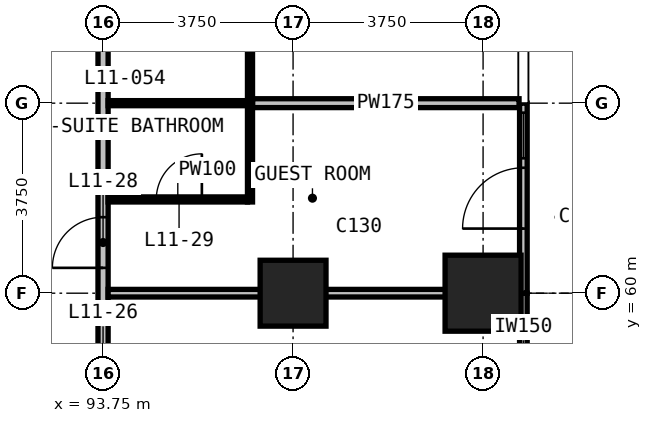
"""IFC4 building model, lengths in metres.
Left out: names, types, materials, properties, quantities, classifications, styles, units other than length and angle.
Written with IfcOpenShell. Run it as: python <this file> out.ifc"""

import sys

from ifc_helpers import new_model, si_unit, direction, frame, frame_2d, origin, origin_2d, place, context, subcontext, project, spatial, rectangle, extrude, element, fill, save


model = new_model("IFC4")
c1 = context("Model", 3, precision=1e-05, world=origin(), true_north=direction((0.0, 1.0)))
c2 = subcontext(c1, "Body", "Model", "MODEL_VIEW")
j1 = project(units=[si_unit("LENGTHUNIT", "METRE"), si_unit("PLANEANGLEUNIT", "RADIAN")], contexts=[c1])
p1 = place(None, origin())
s1 = spatial("IfcSite", under=j1, at=p1, CompositionType="ELEMENT")
p2 = place(p1, origin())
s2 = spatial("IfcBuilding", under=s1, at=p2, CompositionType="ELEMENT")
p3 = place(p2, frame((0.0, 0.0, 56.0)))
s3 = spatial("IfcBuildingStorey", under=s2, at=p3, CompositionType="ELEMENT", Elevation=56.0)
p4 = place(p3, frame((97.5, 60.0, 0.0), z_axis=(0.0, 0.0, 1.0), x_axis=(1.0, 0.0, 0.0)))
e1 = element("IfcColumn", 1, at=p4, inside=s3, PredefinedType="COLUMN", context=c2, shape_type="SweptSolid", body=[
    extrude(rectangle(XDim=1.3, YDim=1.3, at=origin_2d()), origin(), (0.0, 0.0, 1.0), 3.3),
])
p5 = place(p3, frame((101.25, 60.0, 0.0), z_axis=(0.0, 0.0, 1.0), x_axis=(1.0, 0.0, 0.0)))
e2 = element("IfcColumn", 2, at=p5, inside=s3, PredefinedType="COLUMN", context=c2, shape_type="SweptSolid", body=[
    extrude(rectangle(XDim=1.5, YDim=1.5, at=origin_2d()), origin(), (0.0, 0.0, 1.0), 3.3),
])
p6 = place(p3, frame((102.045, 56.25, 0.0), z_axis=(0.0, 0.0, 1.0), x_axis=(0.0, 1.0, 0.0)))
e3 = element("IfcWall", 3, at=p6, inside=s3, PredefinedType="SOLIDWALL", context=c2, shape_type="SweptSolid", body=[
    extrude(rectangle(XDim=3.75, YDim=0.15, at=frame_2d((1.875, 0.0))), origin(), (0.0, 0.0, 1.0), 3.0),
])
p7 = place(p6, frame((0.188, 0.0, 0.1)))
e4 = element("IfcOpeningElement", 4, at=p7, cuts=e3, PredefinedType="OPENING", context=c2, shape_type="SweptSolid", body=[
    extrude(rectangle(XDim=0.9, YDim=2.4, at=frame_2d((0.45, 1.2))), frame((0.0, 0.085, 0.0), z_axis=(0.0, -1.0, 0.0), x_axis=(1.0, 0.0, 0.0)), (0.0, 0.0, 1.0), 0.17),
])
p8 = place(p6, frame((1.275, 0.0, 0.0)))
e5 = element("IfcOpeningElement", 5, at=p8, cuts=e3, PredefinedType="OPENING", context=c2, shape_type="SweptSolid", body=[
    extrude(rectangle(XDim=1.2, YDim=2.4, at=frame_2d((0.6, 1.2))), frame((0.0, 0.085, 0.0), z_axis=(0.0, -1.0, 0.0), x_axis=(1.0, 0.0, 0.0)), (0.0, 0.0, 1.0), 0.17),
])
p9 = place(p3, frame((102.045, 60.0, 0.0), z_axis=(0.0, 0.0, 1.0), x_axis=(0.0, 1.0, 0.0)))
e6 = element("IfcWall", 6, at=p9, inside=s3, PredefinedType="SOLIDWALL", context=c2, shape_type="SweptSolid", body=[
    extrude(rectangle(XDim=3.75, YDim=0.15, at=frame_2d((1.875, 0.0))), origin(), (0.0, 0.0, 1.0), 3.0),
])
p10 = place(p9, frame((1.275, 0.0, 0.0)))
e7 = element("IfcOpeningElement", 7, at=p10, cuts=e6, PredefinedType="OPENING", context=c2, shape_type="SweptSolid", body=[
    extrude(rectangle(XDim=1.2, YDim=2.4, at=frame_2d((0.6, 1.2))), frame((0.0, 0.085, 0.0), z_axis=(0.0, -1.0, 0.0), x_axis=(1.0, 0.0, 0.0)), (0.0, 0.0, 1.0), 0.17),
])
p11 = place(p9, frame((2.663, 0.0, 0.1)))
e8 = element("IfcOpeningElement", 8, at=p11, cuts=e6, PredefinedType="OPENING", context=c2, shape_type="SweptSolid", body=[
    extrude(rectangle(XDim=0.9, YDim=2.4, at=frame_2d((0.45, 1.2))), frame((0.0, 0.085, 0.0), z_axis=(0.0, -1.0, 0.0), x_axis=(1.0, 0.0, 0.0)), (0.0, 0.0, 1.0), 0.17),
])
p12 = place(p3, frame((93.75, 52.4, 0.0), z_axis=(0.0, 0.0, 1.0), x_axis=(0.0, 1.0, 0.0)))
e9 = element("IfcWall", 9, at=p12, inside=s3, PredefinedType="PARTITIONING", context=c2, shape_type="SweptSolid", body=[
    extrude(rectangle(XDim=38.31, YDim=0.2, at=frame_2d((19.155, 0.0))), origin(), (0.0, 0.0, 1.0), 3.0),
])
p13 = place(p12, frame((5.5, 0.0, 0.0)))
e10 = element("IfcOpeningElement", 10, at=p13, cuts=e9, PredefinedType="OPENING", context=c2, shape_type="SweptSolid", body=[
    extrude(rectangle(XDim=1.0, YDim=2.2, at=frame_2d((0.5, 1.1))), frame((0.0, 0.11, 0.0), z_axis=(0.0, -1.0, 0.0), x_axis=(1.0, 0.0, 0.0)), (0.0, 0.0, 1.0), 0.22),
])
p14 = place(p12, frame((8.1, 0.0, 0.0)))
e11 = element("IfcOpeningElement", 11, at=p14, cuts=e9, PredefinedType="OPENING", context=c2, shape_type="SweptSolid", body=[
    extrude(rectangle(XDim=1.0, YDim=2.2, at=frame_2d((0.5, 1.1))), frame((0.0, 0.11, 0.0), z_axis=(0.0, -1.0, 0.0), x_axis=(1.0, 0.0, 0.0)), (0.0, 0.0, 1.0), 0.22),
])
p15 = place(p12, frame((13.6, 0.0, 0.0)))
e12 = element("IfcOpeningElement", 12, at=p15, cuts=e9, PredefinedType="OPENING", context=c2, shape_type="SweptSolid", body=[
    extrude(rectangle(XDim=1.0, YDim=2.2, at=frame_2d((0.5, 1.1))), frame((0.0, 0.11, 0.0), z_axis=(0.0, -1.0, 0.0), x_axis=(1.0, 0.0, 0.0)), (0.0, 0.0, 1.0), 0.22),
])
p16 = place(p12, frame((16.2, 0.0, 0.0)))
e13 = element("IfcOpeningElement", 13, at=p16, cuts=e9, PredefinedType="OPENING", context=c2, shape_type="SweptSolid", body=[
    extrude(rectangle(XDim=1.0, YDim=2.2, at=frame_2d((0.5, 1.1))), frame((0.0, 0.11, 0.0), z_axis=(0.0, -1.0, 0.0), x_axis=(1.0, 0.0, 0.0)), (0.0, 0.0, 1.0), 0.22),
])
p17 = place(p12, frame((24.85, 0.0, 0.0)))
e14 = element("IfcOpeningElement", 14, at=p17, cuts=e9, PredefinedType="OPENING", context=c2, shape_type="SweptSolid", body=[
    extrude(rectangle(XDim=1.0, YDim=2.2, at=frame_2d((0.5, 1.1))), frame((0.0, 0.11, 0.0), z_axis=(0.0, -1.0, 0.0), x_axis=(1.0, 0.0, 0.0)), (0.0, 0.0, 1.0), 0.22),
])
p18 = place(p12, frame((26.85, 0.0, 0.0)))
e15 = element("IfcOpeningElement", 15, at=p18, cuts=e9, PredefinedType="OPENING", context=c2, shape_type="SweptSolid", body=[
    extrude(rectangle(XDim=1.0, YDim=2.2, at=frame_2d((0.5, 1.1))), frame((0.0, 0.11, 0.0), z_axis=(0.0, -1.0, 0.0), x_axis=(1.0, 0.0, 0.0)), (0.0, 0.0, 1.0), 0.22),
])
p19 = place(p12, frame((31.55, 0.0, 0.0)))
e16 = element("IfcOpeningElement", 16, at=p19, cuts=e9, PredefinedType="OPENING", context=c2, shape_type="SweptSolid", body=[
    extrude(rectangle(XDim=0.9, YDim=2.2, at=frame_2d((0.45, 1.1))), frame((0.0, 0.11, 0.0), z_axis=(0.0, -1.0, 0.0), x_axis=(1.0, 0.0, 0.0)), (0.0, 0.0, 1.0), 0.22),
])
p20 = place(p12, frame((35.65, 0.0, 0.0)))
e17 = element("IfcOpeningElement", 17, at=p20, cuts=e9, PredefinedType="OPENING", context=c2, shape_type="SweptSolid", body=[
    extrude(rectangle(XDim=0.9, YDim=2.2, at=frame_2d((0.45, 1.1))), frame((0.0, 0.11, 0.0), z_axis=(0.0, -1.0, 0.0), x_axis=(1.0, 0.0, 0.0)), (0.0, 0.0, 1.0), 0.22),
])
p21 = place(p3, frame((96.7, 63.75, 0.0), z_axis=(0.0, 0.0, 1.0), x_axis=(1.0, 0.0, 0.0)))
e18 = element("IfcWall", 18, at=p21, inside=s3, PredefinedType="PARTITIONING", context=c2, shape_type="SweptSolid", body=[
    extrude(rectangle(XDim=5.26, YDim=0.175, at=frame_2d((2.63, 0.0))), origin(), (0.0, 0.0, 1.0), 3.0),
])
p22 = place(p3, frame((93.85, 60.0, 0.0), z_axis=(0.0, 0.0, 1.0), x_axis=(1.0, 0.0, 0.0)))
e19 = element("IfcWall", 19, at=p22, inside=s3, PredefinedType="PARTITIONING", context=c2, shape_type="SweptSolid", body=[
    extrude(rectangle(XDim=8.11, YDim=0.15, at=frame_2d((4.055, 0.0))), origin(), (0.0, 0.0, 1.0), 3.0),
])
p23 = place(p3, frame((93.85, 61.85, 0.0), z_axis=(0.0, 0.0, 1.0), x_axis=(1.0, 0.0, 0.0)))
e20 = element("IfcWall", 20, at=p23, inside=s3, PredefinedType="PARTITIONING", context=c2, shape_type="SweptSolid", body=[
    extrude(rectangle(XDim=2.75, YDim=0.1, at=frame_2d((1.375, 0.0))), origin(), (0.0, 0.0, 1.0), 3.0),
])
p24 = place(p23, frame((0.95, 0.0, 0.0)))
e21 = element("IfcOpeningElement", 21, at=p24, cuts=e20, PredefinedType="OPENING", context=c2, shape_type="SweptSolid", body=[
    extrude(rectangle(XDim=0.9, YDim=2.2, at=frame_2d((0.45, 1.1))), frame((0.0, 0.06, 0.0), z_axis=(0.0, -1.0, 0.0), x_axis=(1.0, 0.0, 0.0)), (0.0, 0.0, 1.0), 0.12),
])
p25 = place(p3, frame((93.85, 63.75, 0.0), z_axis=(0.0, 0.0, 1.0), x_axis=(1.0, 0.0, 0.0)))
e22 = element("IfcWall", 22, at=p25, inside=s3, PredefinedType="PARTITIONING", context=c2, shape_type="SweptSolid", body=[
    extrude(rectangle(XDim=2.75, YDim=0.1, at=frame_2d((1.375, 0.0))), origin(), (0.0, 0.0, 1.0), 3.0),
])
p26 = place(p3, frame((96.65, 61.8, 0.0), z_axis=(0.0, 0.0, 1.0), x_axis=(0.0, 1.0, 0.0)))
e23 = element("IfcWall", 23, at=p26, inside=s3, PredefinedType="PARTITIONING", context=c2, shape_type="SweptSolid", body=[
    extrude(rectangle(XDim=3.9, YDim=0.1, at=frame_2d((1.95, 0.0))), origin(), (0.0, 0.0, 1.0), 3.0),
])
p27 = place(p10, origin())
e24 = element("IfcDoor", 24, at=p27, inside=s3, OperationType="SINGLE_SWING_LEFT", PredefinedType="DOOR", context=c2, shape_type="SweptSolid", body=[
    extrude(rectangle(XDim=1.2, YDim=2.4, at=frame_2d((0.6, 1.2))), frame((0.0, 0.025, 0.0), z_axis=(0.0, -1.0, 0.0), x_axis=(1.0, 0.0, 0.0)), (0.0, 0.0, 1.0), 0.05),
])
fill(e7, e24)
p28 = place(p11, origin())
e25 = element("IfcWindow", 25, at=p28, inside=s3, PartitioningType="SINGLE_PANEL", PredefinedType="WINDOW", context=c2, shape_type="SweptSolid", body=[
    extrude(rectangle(XDim=0.9, YDim=2.4, at=frame_2d((0.45, 1.2))), frame((0.0, 0.03, 0.0), z_axis=(0.0, -1.0, 0.0), x_axis=(1.0, 0.0, 0.0)), (0.0, 0.0, 1.0), 0.06),
])
fill(e8, e25)
p29 = place(p14, origin())
e26 = element("IfcDoor", 26, at=p29, inside=s3, OperationType="SINGLE_SWING_RIGHT", PredefinedType="DOOR", context=c2, shape_type="SweptSolid", body=[
    extrude(rectangle(XDim=1.0, YDim=2.2, at=frame_2d((0.5, 1.1))), frame((0.0, 0.025, 0.0), z_axis=(0.0, -1.0, 0.0), x_axis=(1.0, 0.0, 0.0)), (0.0, 0.0, 1.0), 0.05),
])
fill(e11, e26)
p30 = place(p24, origin())
e27 = element("IfcDoor", 27, at=p30, inside=s3, OperationType="SINGLE_SWING_RIGHT", PredefinedType="DOOR", context=c2, shape_type="SweptSolid", body=[
    extrude(rectangle(XDim=0.9, YDim=2.2, at=frame_2d((0.45, 1.1))), frame((0.0, 0.025, 0.0), z_axis=(0.0, -1.0, 0.0), x_axis=(1.0, 0.0, 0.0)), (0.0, 0.0, 1.0), 0.05),
])
fill(e21, e27)
save(model, sys.argv[1])
